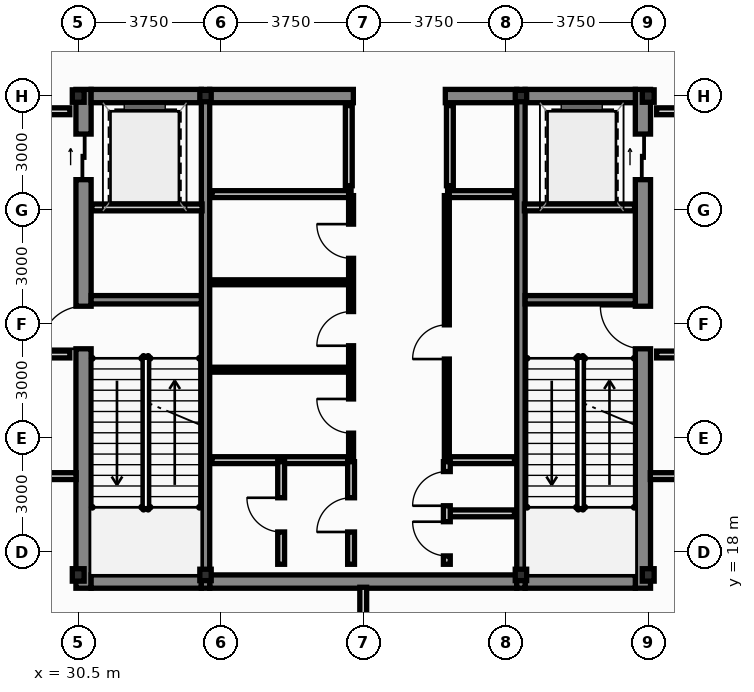
"""IFC4 building model, lengths in metres.
Left out: names, types, materials, properties, quantities, classifications, styles, units other than length and angle.
Written with IfcOpenShell. Run it as: python <this file> out.ifc"""

import sys

from ifc_helpers import new_model, si_unit, direction, frame, frame_2d, origin, origin_2d, place, context, subcontext, project, spatial, rectangle, hollow_rectangle, i_section, extrude, source, transform, mapped, element, fill, save


model = new_model("IFC4")
c1 = context("Model", 3, precision=1e-05, world=origin(), true_north=direction((0.0, 1.0)))
c2 = subcontext(c1, "Body", "Model", "MODEL_VIEW")
j1 = project(units=[si_unit("LENGTHUNIT", "METRE"), si_unit("PLANEANGLEUNIT", "RADIAN")], contexts=[c1])
p1 = place(None, origin())
s1 = spatial("IfcSite", under=j1, at=p1, CompositionType="ELEMENT")
p2 = place(p1, origin())
s2 = spatial("IfcBuilding", under=s1, at=p2, CompositionType="ELEMENT")
p3 = place(p2, frame((0.0, 0.0, 284.6)))
s3 = spatial("IfcBuildingStorey", under=s2, at=p3, CompositionType="ELEMENT", Elevation=284.6)
m1 = source(origin(), c2, "Body", "SweptSolid", [
    extrude(i_section(OverallWidth=0.311, OverallDepth=0.327, WebThickness=0.016, FlangeThickness=0.025, at=origin_2d()), origin(), (0.0, 0.0, 1.0), 5.2),
])
for number, where, z_axis, x_axis in (
    (1, (30.5, 17.4, 0.0), (0.0, 0.0, 1.0), (1.0, 0.0, 0.0)),
    (2, (45.5, 17.4, 0.0), (0.0, 0.0, 1.0), (1.0, 0.0, 0.0)),
    (3, (45.5, 30.0, 0.0), (0.0, 0.0, 1.0), (1.0, 0.0, 0.0)),
    (4, (30.5, 30.0, 0.0), (0.0, 0.0, 1.0), (1.0, 0.0, 0.0)),
):
    element("IfcColumn", number, at=place(p3, frame(where, z_axis=z_axis, x_axis=x_axis)), inside=s3, PredefinedType="COLUMN", context=c2, shape_type="MappedRepresentation", body=[
        mapped(m1, transform((0.0, 0.0, 0.0), scale=1.0)),
    ])
m2 = source(origin(), c2, "Body", "SweptSolid", [
    extrude(hollow_rectangle(XDim=0.3, YDim=0.3, WallThickness=0.012, at=origin_2d()), origin(), (0.0, 0.0, 1.0), 5.2),
])
for number, where, z_axis, x_axis in (
    (5, (33.85, 17.4, 0.0), (0.0, 0.0, 1.0), (1.0, 0.0, 0.0)),
    (6, (42.15, 17.4, 0.0), (0.0, 0.0, 1.0), (1.0, 0.0, 0.0)),
    (7, (33.85, 30.0, 0.0), (0.0, 0.0, 1.0), (1.0, 0.0, 0.0)),
    (8, (42.15, 30.0, 0.0), (0.0, 0.0, 1.0), (1.0, 0.0, 0.0)),
):
    element("IfcColumn", number, at=place(p3, frame(where, z_axis=z_axis, x_axis=x_axis)), inside=s3, PredefinedType="COLUMN", context=c2, shape_type="MappedRepresentation", body=[
        mapped(m2, transform((0.0, 0.0, 0.0), scale=1.0)),
    ])
p4 = place(p3, frame((30.64, 17.05, 0.0), z_axis=(0.0, 0.0, 1.0), x_axis=(0.0, 1.0, 0.0)))
e9 = element("IfcWall", 9, at=p4, inside=s3, PredefinedType="SHEAR", context=c2, shape_type="SweptSolid", body=[
    extrude(rectangle(XDim=13.125, YDim=0.4, at=frame_2d((6.562, 0.0))), origin(), (0.0, 0.0, 1.0), 5.2),
])
p5 = place(p4, frame((6.3, 0.0, 0.0)))
e10 = element("IfcOpeningElement", 10, at=p5, cuts=e9, PredefinedType="OPENING", context=c2, shape_type="SweptSolid", body=[
    extrude(rectangle(XDim=1.12, YDim=2.15, at=frame_2d((0.56, 1.075))), frame((0.0, 0.212, 0.0), z_axis=(0.0, -1.0, 0.0), x_axis=(1.0, 0.0, 0.0)), (0.0, 0.0, 1.0), 0.424),
])
p6 = place(p4, frame((10.75, 0.0, 0.0)))
e11 = element("IfcOpeningElement", 11, at=p6, cuts=e9, PredefinedType="OPENING", context=c2, shape_type="SweptSolid", body=[
    extrude(rectangle(XDim=1.2, YDim=2.2, at=frame_2d((0.6, 1.1))), frame((0.0, 0.212, 0.0), z_axis=(0.0, -1.0, 0.0), x_axis=(1.0, 0.0, 0.0)), (0.0, 0.0, 1.0), 0.424),
])
p7 = place(p3, frame((45.36, 17.05, 0.0), z_axis=(0.0, 0.0, 1.0), x_axis=(0.0, 1.0, 0.0)))
e12 = element("IfcWall", 12, at=p7, inside=s3, PredefinedType="SHEAR", context=c2, shape_type="SweptSolid", body=[
    extrude(rectangle(XDim=13.125, YDim=0.4, at=frame_2d((6.562, 0.0))), origin(), (0.0, 0.0, 1.0), 5.2),
])
p8 = place(p7, frame((6.3, 0.0, 0.0)))
e13 = element("IfcOpeningElement", 13, at=p8, cuts=e12, PredefinedType="OPENING", context=c2, shape_type="SweptSolid", body=[
    extrude(rectangle(XDim=1.12, YDim=2.15, at=frame_2d((0.56, 1.075))), frame((0.0, 0.212, 0.0), z_axis=(0.0, -1.0, 0.0), x_axis=(1.0, 0.0, 0.0)), (0.0, 0.0, 1.0), 0.424),
])
p9 = place(p7, frame((10.75, 0.0, 0.0)))
e14 = element("IfcOpeningElement", 14, at=p9, cuts=e12, PredefinedType="OPENING", context=c2, shape_type="SweptSolid", body=[
    extrude(rectangle(XDim=1.2, YDim=2.2, at=frame_2d((0.6, 1.1))), frame((0.0, 0.212, 0.0), z_axis=(0.0, -1.0, 0.0), x_axis=(1.0, 0.0, 0.0)), (0.0, 0.0, 1.0), 0.424),
])
p10 = place(p3, frame((30.84, 17.225, 0.0), z_axis=(0.0, 0.0, 1.0), x_axis=(1.0, 0.0, 0.0)))
e15 = element("IfcWall", 15, at=p10, inside=s3, PredefinedType="SHEAR", context=c2, shape_type="SweptSolid", body=[
    extrude(rectangle(XDim=2.9, YDim=0.35, at=frame_2d((1.45, 0.0))), origin(), (0.0, 0.0, 1.0), 5.2),
])
p11 = place(p3, frame((33.96, 17.225, 0.0), z_axis=(0.0, 0.0, 1.0), x_axis=(1.0, 0.0, 0.0)))
e16 = element("IfcWall", 16, at=p11, inside=s3, PredefinedType="SHEAR", context=c2, shape_type="SweptSolid", body=[
    extrude(rectangle(XDim=8.08, YDim=0.35, at=frame_2d((4.04, 0.0))), origin(), (0.0, 0.0, 1.0), 5.2),
])
for number, where, z_axis, x_axis in (
    (17, (42.26, 17.225, 0.0), (0.0, 0.0, 1.0), (1.0, 0.0, 0.0)),
    (18, (30.84, 30.0, 0.0), (0.0, 0.0, 1.0), (1.0, 0.0, 0.0)),
):
    element("IfcWall", number, at=place(p3, frame(where, z_axis=z_axis, x_axis=x_axis)), inside=s3, PredefinedType="SHEAR", context=c2, shape_type="SweptSolid", body=[
        extrude(rectangle(XDim=2.9, YDim=0.35, at=frame_2d((1.45, 0.0))), origin(), (0.0, 0.0, 1.0), 5.2),
    ])
p12 = place(p3, frame((33.96, 30.0, 0.0), z_axis=(0.0, 0.0, 1.0), x_axis=(1.0, 0.0, 0.0)))
e19 = element("IfcWall", 19, at=p12, inside=s3, PredefinedType="SHEAR", context=c2, shape_type="SweptSolid", body=[
    extrude(rectangle(XDim=3.78, YDim=0.35, at=frame_2d((1.89, 0.0))), origin(), (0.0, 0.0, 1.0), 5.2),
])
p13 = place(p3, frame((40.16, 30.0, 0.0), z_axis=(0.0, 0.0, 1.0), x_axis=(1.0, 0.0, 0.0)))
e20 = element("IfcWall", 20, at=p13, inside=s3, PredefinedType="SHEAR", context=c2, shape_type="SweptSolid", body=[
    extrude(rectangle(XDim=1.88, YDim=0.35, at=frame_2d((0.94, 0.0))), origin(), (0.0, 0.0, 1.0), 5.2),
])
p14 = place(p3, frame((42.26, 30.0, 0.0), z_axis=(0.0, 0.0, 1.0), x_axis=(1.0, 0.0, 0.0)))
e21 = element("IfcWall", 21, at=p14, inside=s3, PredefinedType="SHEAR", context=c2, shape_type="SweptSolid", body=[
    extrude(rectangle(XDim=2.9, YDim=0.35, at=frame_2d((1.45, 0.0))), origin(), (0.0, 0.0, 1.0), 5.2),
])
for number, where, z_axis, x_axis in (
    (22, (33.85, 17.05, 0.0), (0.0, 0.0, 1.0), (0.0, 1.0, 0.0)),
    (23, (42.15, 17.05, 0.0), (0.0, 0.0, 1.0), (0.0, 1.0, 0.0)),
):
    element("IfcWall", number, at=place(p3, frame(where, z_axis=z_axis, x_axis=x_axis)), inside=s3, PredefinedType="SHEAR", context=c2, shape_type="SweptSolid", body=[
        extrude(rectangle(XDim=13.125, YDim=0.22, at=frame_2d((6.562, 0.0))), origin(), (0.0, 0.0, 1.0), 5.2),
    ])
for number, where, z_axis, x_axis in (
    (24, (30.84, 24.64, 0.0), (0.0, 0.0, 1.0), (1.0, 0.0, 0.0)),
    (25, (42.26, 24.64, 0.0), (0.0, 0.0, 1.0), (1.0, 0.0, 0.0)),
):
    element("IfcWall", number, at=place(p3, frame(where, z_axis=z_axis, x_axis=x_axis)), inside=s3, PredefinedType="SHEAR", context=c2, shape_type="SweptSolid", body=[
        extrude(rectangle(XDim=2.9, YDim=0.22, at=frame_2d((1.45, 0.0))), origin(), (0.0, 0.0, 1.0), 5.2),
    ])
p15 = place(p3, frame((34.02, 27.42, 0.0), z_axis=(0.0, 0.0, 1.0), x_axis=(1.0, 0.0, 0.0)))
e26 = element("IfcWall", 26, at=p15, inside=s3, PredefinedType="PARTITIONING", context=c2, shape_type="SweptSolid", body=[
    extrude(rectangle(XDim=3.66, YDim=0.18, at=frame_2d((1.83, 0.0))), origin(), (0.0, 0.0, 1.0), 4.95),
])
p16 = place(p3, frame((40.22, 27.42, 0.0), z_axis=(0.0, 0.0, 1.0), x_axis=(1.0, 0.0, 0.0)))
e27 = element("IfcWall", 27, at=p16, inside=s3, PredefinedType="PARTITIONING", context=c2, shape_type="SweptSolid", body=[
    extrude(rectangle(XDim=1.76, YDim=0.18, at=frame_2d((0.88, 0.0))), origin(), (0.0, 0.0, 1.0), 4.95),
])
for number, where, z_axis, x_axis in (
    (28, (37.62, 27.64, 0.0), (0.0, 0.0, 1.0), (0.0, 1.0, 0.0)),
    (29, (40.28, 27.64, 0.0), (0.0, 0.0, 1.0), (0.0, 1.0, 0.0)),
):
    element("IfcWall", number, at=place(p3, frame(where, z_axis=z_axis, x_axis=x_axis)), inside=s3, PredefinedType="PARTITIONING", context=c2, shape_type="SweptSolid", body=[
        extrude(rectangle(XDim=2.11, YDim=0.18, at=frame_2d((1.055, 0.0))), origin(), (0.0, 0.0, 1.0), 4.95),
    ])
for number, where, z_axis, x_axis in (
    (30, (27.52, 23.2, 0.0), (0.0, 0.0, 1.0), (1.0, 0.0, 0.0)),
    (31, (27.52, 29.6, 0.0), (0.0, 0.0, 1.0), (1.0, 0.0, 0.0)),
    (32, (45.72, 23.2, 0.0), (0.0, 0.0, 1.0), (1.0, 0.0, 0.0)),
    (33, (45.72, 29.6, 0.0), (0.0, 0.0, 1.0), (1.0, 0.0, 0.0)),
):
    element("IfcWall", number, at=place(p3, frame(where, z_axis=z_axis, x_axis=x_axis)), inside=s3, PredefinedType="PARTITIONING", context=c2, shape_type="SweptSolid", body=[
        extrude(rectangle(XDim=2.76, YDim=0.18, at=frame_2d((1.38, 0.0))), origin(), (0.0, 0.0, 1.0), 4.95),
    ])
for number, where, z_axis, x_axis in (
    (34, (30.86, 27.07, 0.0), (0.0, 0.0, 1.0), (1.0, 0.0, 0.0)),
    (35, (42.24, 27.07, 0.0), (0.0, 0.0, 1.0), (1.0, 0.0, 0.0)),
):
    element("IfcWall", number, at=place(p3, frame(where, z_axis=z_axis, x_axis=x_axis)), inside=s3, PredefinedType="PARTITIONING", context=c2, shape_type="SweptSolid", body=[
        extrude(rectangle(XDim=2.9, YDim=0.18, at=frame_2d((1.45, 0.0))), origin(), (0.0, 0.0, 1.0), 4.95),
    ])
p17 = place(p3, frame((34.02, 20.42, 0.0), z_axis=(0.0, 0.0, 1.0), x_axis=(1.0, 0.0, 0.0)))
e36 = element("IfcWall", 36, at=p17, inside=s3, PredefinedType="PARTITIONING", context=c2, shape_type="SweptSolid", body=[
    extrude(rectangle(XDim=3.64, YDim=0.18, at=frame_2d((1.82, 0.0))), origin(), (0.0, 0.0, 1.0), 4.95),
])
p18 = place(p3, frame((40.22, 20.42, 0.0), z_axis=(0.0, 0.0, 1.0), x_axis=(1.0, 0.0, 0.0)))
e37 = element("IfcWall", 37, at=p18, inside=s3, PredefinedType="PARTITIONING", context=c2, shape_type="SweptSolid", body=[
    extrude(rectangle(XDim=1.76, YDim=0.18, at=frame_2d((0.88, 0.0))), origin(), (0.0, 0.0, 1.0), 4.95),
])
for number, where, z_axis, x_axis in (
    (38, (34.02, 22.8, 0.0), (0.0, 0.0, 1.0), (1.0, 0.0, 0.0)),
    (39, (34.02, 25.1, 0.0), (0.0, 0.0, 1.0), (1.0, 0.0, 0.0)),
):
    element("IfcWall", number, at=place(p3, frame(where, z_axis=z_axis, x_axis=x_axis)), inside=s3, PredefinedType="PARTITIONING", context=c2, shape_type="SweptSolid", body=[
        extrude(rectangle(XDim=3.58, YDim=0.13, at=frame_2d((1.79, 0.0))), origin(), (0.0, 0.0, 1.0), 4.95),
    ])
p19 = place(p3, frame((37.68, 20.48, 0.0), z_axis=(0.0, 0.0, 1.0), x_axis=(0.0, 1.0, 0.0)))
e40 = element("IfcWall", 40, at=p19, inside=s3, PredefinedType="PARTITIONING", context=c2, shape_type="SweptSolid", body=[
    extrude(rectangle(XDim=6.9, YDim=0.13, at=frame_2d((3.45, 0.0))), origin(), (0.0, 0.0, 1.0), 4.95),
])
p20 = place(p19, frame((0.65, 0.0, 0.0)))
e41 = element("IfcOpeningElement", 41, at=p20, cuts=e40, PredefinedType="OPENING", context=c2, shape_type="SweptSolid", body=[
    extrude(rectangle(XDim=0.9, YDim=2.1, at=frame_2d((0.45, 1.05))), frame((0.0, 0.077, 0.0), z_axis=(0.0, -1.0, 0.0), x_axis=(1.0, 0.0, 0.0)), (0.0, 0.0, 1.0), 0.154),
])
p21 = place(p19, frame((2.95, 0.0, 0.0)))
e42 = element("IfcOpeningElement", 42, at=p21, cuts=e40, PredefinedType="OPENING", context=c2, shape_type="SweptSolid", body=[
    extrude(rectangle(XDim=0.9, YDim=2.1, at=frame_2d((0.45, 1.05))), frame((0.0, 0.077, 0.0), z_axis=(0.0, -1.0, 0.0), x_axis=(1.0, 0.0, 0.0)), (0.0, 0.0, 1.0), 0.154),
])
p22 = place(p19, frame((5.25, 0.0, 0.0)))
e43 = element("IfcOpeningElement", 43, at=p22, cuts=e40, PredefinedType="OPENING", context=c2, shape_type="SweptSolid", body=[
    extrude(rectangle(XDim=0.9, YDim=2.1, at=frame_2d((0.45, 1.05))), frame((0.0, 0.077, 0.0), z_axis=(0.0, -1.0, 0.0), x_axis=(1.0, 0.0, 0.0)), (0.0, 0.0, 1.0), 0.154),
])
p23 = place(p3, frame((40.2, 20.48, 0.0), z_axis=(0.0, 0.0, 1.0), x_axis=(0.0, 1.0, 0.0)))
e44 = element("IfcWall", 44, at=p23, inside=s3, PredefinedType="PARTITIONING", context=c2, shape_type="SweptSolid", body=[
    extrude(rectangle(XDim=6.9, YDim=0.13, at=frame_2d((3.45, 0.0))), origin(), (0.0, 0.0, 1.0), 4.95),
])
p24 = place(p23, frame((2.6, 0.0, 0.0)))
e45 = element("IfcOpeningElement", 45, at=p24, cuts=e44, PredefinedType="OPENING", context=c2, shape_type="SweptSolid", body=[
    extrude(rectangle(XDim=0.9, YDim=2.1, at=frame_2d((0.45, 1.05))), frame((0.0, 0.077, 0.0), z_axis=(0.0, -1.0, 0.0), x_axis=(1.0, 0.0, 0.0)), (0.0, 0.0, 1.0), 0.154),
])
p25 = place(p3, frame((35.84, 17.68, 0.0), z_axis=(0.0, 0.0, 1.0), x_axis=(0.0, 1.0, 0.0)))
e46 = element("IfcWall", 46, at=p25, inside=s3, PredefinedType="PARTITIONING", context=c2, shape_type="SweptSolid", body=[
    extrude(rectangle(XDim=2.7, YDim=0.18, at=frame_2d((1.35, 0.0))), origin(), (0.0, 0.0, 1.0), 4.95),
])
p26 = place(p25, frame((0.85, 0.0, 0.0)))
e47 = element("IfcOpeningElement", 47, at=p26, cuts=e46, PredefinedType="OPENING", context=c2, shape_type="SweptSolid", body=[
    extrude(rectangle(XDim=0.9, YDim=2.1, at=frame_2d((0.45, 1.05))), frame((0.0, 0.102, 0.0), z_axis=(0.0, -1.0, 0.0), x_axis=(1.0, 0.0, 0.0)), (0.0, 0.0, 1.0), 0.204),
])
p27 = place(p3, frame((37.68, 17.68, 0.0), z_axis=(0.0, 0.0, 1.0), x_axis=(0.0, 1.0, 0.0)))
e48 = element("IfcWall", 48, at=p27, inside=s3, PredefinedType="PARTITIONING", context=c2, shape_type="SweptSolid", body=[
    extrude(rectangle(XDim=2.7, YDim=0.18, at=frame_2d((1.35, 0.0))), origin(), (0.0, 0.0, 1.0), 4.95),
])
p28 = place(p27, frame((0.85, 0.0, 0.0)))
e49 = element("IfcOpeningElement", 49, at=p28, cuts=e48, PredefinedType="OPENING", context=c2, shape_type="SweptSolid", body=[
    extrude(rectangle(XDim=0.9, YDim=2.1, at=frame_2d((0.45, 1.05))), frame((0.0, 0.102, 0.0), z_axis=(0.0, -1.0, 0.0), x_axis=(1.0, 0.0, 0.0)), (0.0, 0.0, 1.0), 0.204),
])
p29 = place(p3, frame((40.28, 19.02, 0.0), z_axis=(0.0, 0.0, 1.0), x_axis=(1.0, 0.0, 0.0)))
e50 = element("IfcWall", 50, at=p29, inside=s3, PredefinedType="PARTITIONING", context=c2, shape_type="SweptSolid", body=[
    extrude(rectangle(XDim=1.7, YDim=0.18, at=frame_2d((0.85, 0.0))), origin(), (0.0, 0.0, 1.0), 4.95),
])
p30 = place(p3, frame((40.2, 17.68, 0.0), z_axis=(0.0, 0.0, 1.0), x_axis=(0.0, 1.0, 0.0)))
e51 = element("IfcWall", 51, at=p30, inside=s3, PredefinedType="PARTITIONING", context=c2, shape_type="SweptSolid", body=[
    extrude(rectangle(XDim=2.7, YDim=0.18, at=frame_2d((1.35, 0.0))), origin(), (0.0, 0.0, 1.0), 4.95),
])
p31 = place(p30, frame((0.22, 0.0, 0.0)))
e52 = element("IfcOpeningElement", 52, at=p31, cuts=e51, PredefinedType="OPENING", context=c2, shape_type="SweptSolid", body=[
    extrude(rectangle(XDim=0.9, YDim=2.1, at=frame_2d((0.45, 1.05))), frame((0.0, 0.102, 0.0), z_axis=(0.0, -1.0, 0.0), x_axis=(1.0, 0.0, 0.0)), (0.0, 0.0, 1.0), 0.204),
])
p32 = place(p30, frame((1.54, 0.0, 0.0)))
e53 = element("IfcOpeningElement", 53, at=p32, cuts=e51, PredefinedType="OPENING", context=c2, shape_type="SweptSolid", body=[
    extrude(rectangle(XDim=0.9, YDim=2.1, at=frame_2d((0.45, 1.05))), frame((0.0, 0.102, 0.0), z_axis=(0.0, -1.0, 0.0), x_axis=(1.0, 0.0, 0.0)), (0.0, 0.0, 1.0), 0.204),
])
p33 = place(p3, frame((17.53, 20.0, 0.0), z_axis=(0.0, 0.0, 1.0), x_axis=(1.0, 0.0, 0.0)))
e54 = element("IfcWall", 54, at=p33, inside=s3, PredefinedType="PARTITIONING", context=c2, shape_type="SweptSolid", body=[
    extrude(rectangle(XDim=12.915, YDim=0.18, at=frame_2d((6.458, 0.0))), origin(), (0.0, 0.0, 1.0), 4.95),
])
p34 = place(p33, frame((5.932, 0.0, 0.0)))
e55 = element("IfcOpeningElement", 55, at=p34, cuts=e54, PredefinedType="OPENING", context=c2, shape_type="SweptSolid", body=[
    extrude(rectangle(XDim=1.05, YDim=2.15, at=frame_2d((0.525, 1.075))), frame((0.0, 0.102, 0.0), z_axis=(0.0, -1.0, 0.0), x_axis=(1.0, 0.0, 0.0)), (0.0, 0.0, 1.0), 0.204),
])
p35 = place(p3, frame((45.555, 20.0, 0.0), z_axis=(0.0, 0.0, 1.0), x_axis=(1.0, 0.0, 0.0)))
e56 = element("IfcWall", 56, at=p35, inside=s3, PredefinedType="PARTITIONING", context=c2, shape_type="SweptSolid", body=[
    extrude(rectangle(XDim=11.775, YDim=0.18, at=frame_2d((5.888, 0.0))), origin(), (0.0, 0.0, 1.0), 4.95),
])
p36 = place(p35, frame((5.362, 0.0, 0.0)))
e57 = element("IfcOpeningElement", 57, at=p36, cuts=e56, PredefinedType="OPENING", context=c2, shape_type="SweptSolid", body=[
    extrude(rectangle(XDim=1.05, YDim=2.15, at=frame_2d((0.525, 1.075))), frame((0.0, 0.102, 0.0), z_axis=(0.0, -1.0, 0.0), x_axis=(1.0, 0.0, 0.0)), (0.0, 0.0, 1.0), 0.204),
])
p37 = place(p3, frame((38.0, 8.81, 0.0), z_axis=(0.0, 0.0, 1.0), x_axis=(0.0, 1.0, 0.0)))
e58 = element("IfcWall", 58, at=p37, inside=s3, PredefinedType="PARTITIONING", context=c2, shape_type="SweptSolid", body=[
    extrude(rectangle(XDim=8.265, YDim=0.18, at=frame_2d((4.132, 0.0))), origin(), (0.0, 0.0, 1.0), 4.95),
])
p38 = place(p5, origin())
e59 = element("IfcDoor", 59, at=p38, inside=s3, OperationType="SINGLE_SWING_LEFT", PredefinedType="DOOR", context=c2, shape_type="SweptSolid", body=[
    extrude(rectangle(XDim=1.12, YDim=2.15, at=frame_2d((0.56, 1.075))), frame((0.0, 0.025, 0.0), z_axis=(0.0, -1.0, 0.0), x_axis=(1.0, 0.0, 0.0)), (0.0, 0.0, 1.0), 0.05),
])
fill(e10, e59)
p39 = place(p6, origin())
e60 = element("IfcDoor", 60, at=p39, inside=s3, OperationType="SLIDING_TO_LEFT", PredefinedType="DOOR", context=c2, shape_type="SweptSolid", body=[
    extrude(rectangle(XDim=1.2, YDim=2.2, at=frame_2d((0.6, 1.1))), frame((0.0, 0.025, 0.0), z_axis=(0.0, -1.0, 0.0), x_axis=(1.0, 0.0, 0.0)), (0.0, 0.0, 1.0), 0.05),
])
fill(e11, e60)
p40 = place(p8, origin())
e61 = element("IfcDoor", 61, at=p40, inside=s3, OperationType="SINGLE_SWING_RIGHT", PredefinedType="DOOR", context=c2, shape_type="SweptSolid", body=[
    extrude(rectangle(XDim=1.12, YDim=2.15, at=frame_2d((0.56, 1.075))), frame((0.0, 0.025, 0.0), z_axis=(0.0, -1.0, 0.0), x_axis=(1.0, 0.0, 0.0)), (0.0, 0.0, 1.0), 0.05),
])
fill(e13, e61)
p41 = place(p9, origin())
e62 = element("IfcDoor", 62, at=p41, inside=s3, OperationType="SLIDING_TO_RIGHT", PredefinedType="DOOR", context=c2, shape_type="SweptSolid", body=[
    extrude(rectangle(XDim=1.2, YDim=2.2, at=frame_2d((0.6, 1.1))), frame((0.0, 0.025, 0.0), z_axis=(0.0, -1.0, 0.0), x_axis=(1.0, 0.0, 0.0)), (0.0, 0.0, 1.0), 0.05),
])
fill(e14, e62)
p42 = place(p20, origin())
e63 = element("IfcDoor", 63, at=p42, inside=s3, OperationType="SINGLE_SWING_RIGHT", PredefinedType="DOOR", context=c2, shape_type="SweptSolid", body=[
    extrude(rectangle(XDim=0.9, YDim=2.1, at=frame_2d((0.45, 1.05))), frame((0.0, 0.025, 0.0), z_axis=(0.0, -1.0, 0.0), x_axis=(1.0, 0.0, 0.0)), (0.0, 0.0, 1.0), 0.05),
])
fill(e41, e63)
p43 = place(p21, origin())
e64 = element("IfcDoor", 64, at=p43, inside=s3, OperationType="SINGLE_SWING_LEFT", PredefinedType="DOOR", context=c2, shape_type="SweptSolid", body=[
    extrude(rectangle(XDim=0.9, YDim=2.1, at=frame_2d((0.45, 1.05))), frame((0.0, 0.025, 0.0), z_axis=(0.0, -1.0, 0.0), x_axis=(1.0, 0.0, 0.0)), (0.0, 0.0, 1.0), 0.05),
])
fill(e42, e64)
p44 = place(p22, origin())
e65 = element("IfcDoor", 65, at=p44, inside=s3, OperationType="SINGLE_SWING_RIGHT", PredefinedType="DOOR", context=c2, shape_type="SweptSolid", body=[
    extrude(rectangle(XDim=0.9, YDim=2.1, at=frame_2d((0.45, 1.05))), frame((0.0, 0.025, 0.0), z_axis=(0.0, -1.0, 0.0), x_axis=(1.0, 0.0, 0.0)), (0.0, 0.0, 1.0), 0.05),
])
fill(e43, e65)
p45 = place(p24, origin())
e66 = element("IfcDoor", 66, at=p45, inside=s3, OperationType="SINGLE_SWING_LEFT", PredefinedType="DOOR", context=c2, shape_type="SweptSolid", body=[
    extrude(rectangle(XDim=0.9, YDim=2.1, at=frame_2d((0.45, 1.05))), frame((0.0, 0.025, 0.0), z_axis=(0.0, -1.0, 0.0), x_axis=(1.0, 0.0, 0.0)), (0.0, 0.0, 1.0), 0.05),
])
fill(e45, e66)
p46 = place(p26, origin())
e67 = element("IfcDoor", 67, at=p46, inside=s3, OperationType="SINGLE_SWING_RIGHT", PredefinedType="DOOR", context=c2, shape_type="SweptSolid", body=[
    extrude(rectangle(XDim=0.9, YDim=2.1, at=frame_2d((0.45, 1.05))), frame((0.0, 0.025, 0.0), z_axis=(0.0, -1.0, 0.0), x_axis=(1.0, 0.0, 0.0)), (0.0, 0.0, 1.0), 0.05),
])
fill(e47, e67)
p47 = place(p28, origin())
e68 = element("IfcDoor", 68, at=p47, inside=s3, OperationType="SINGLE_SWING_LEFT", PredefinedType="DOOR", context=c2, shape_type="SweptSolid", body=[
    extrude(rectangle(XDim=0.9, YDim=2.1, at=frame_2d((0.45, 1.05))), frame((0.0, 0.025, 0.0), z_axis=(0.0, -1.0, 0.0), x_axis=(1.0, 0.0, 0.0)), (0.0, 0.0, 1.0), 0.05),
])
fill(e49, e68)
p48 = place(p31, origin())
e69 = element("IfcDoor", 69, at=p48, inside=s3, OperationType="SINGLE_SWING_RIGHT", PredefinedType="DOOR", context=c2, shape_type="SweptSolid", body=[
    extrude(rectangle(XDim=0.9, YDim=2.1, at=frame_2d((0.45, 1.05))), frame((0.0, 0.025, 0.0), z_axis=(0.0, -1.0, 0.0), x_axis=(1.0, 0.0, 0.0)), (0.0, 0.0, 1.0), 0.05),
])
fill(e52, e69)
p49 = place(p32, origin())
e70 = element("IfcDoor", 70, at=p49, inside=s3, OperationType="SINGLE_SWING_LEFT", PredefinedType="DOOR", context=c2, shape_type="SweptSolid", body=[
    extrude(rectangle(XDim=0.9, YDim=2.1, at=frame_2d((0.45, 1.05))), frame((0.0, 0.025, 0.0), z_axis=(0.0, -1.0, 0.0), x_axis=(1.0, 0.0, 0.0)), (0.0, 0.0, 1.0), 0.05),
])
fill(e53, e70)
save(model, sys.argv[1])
